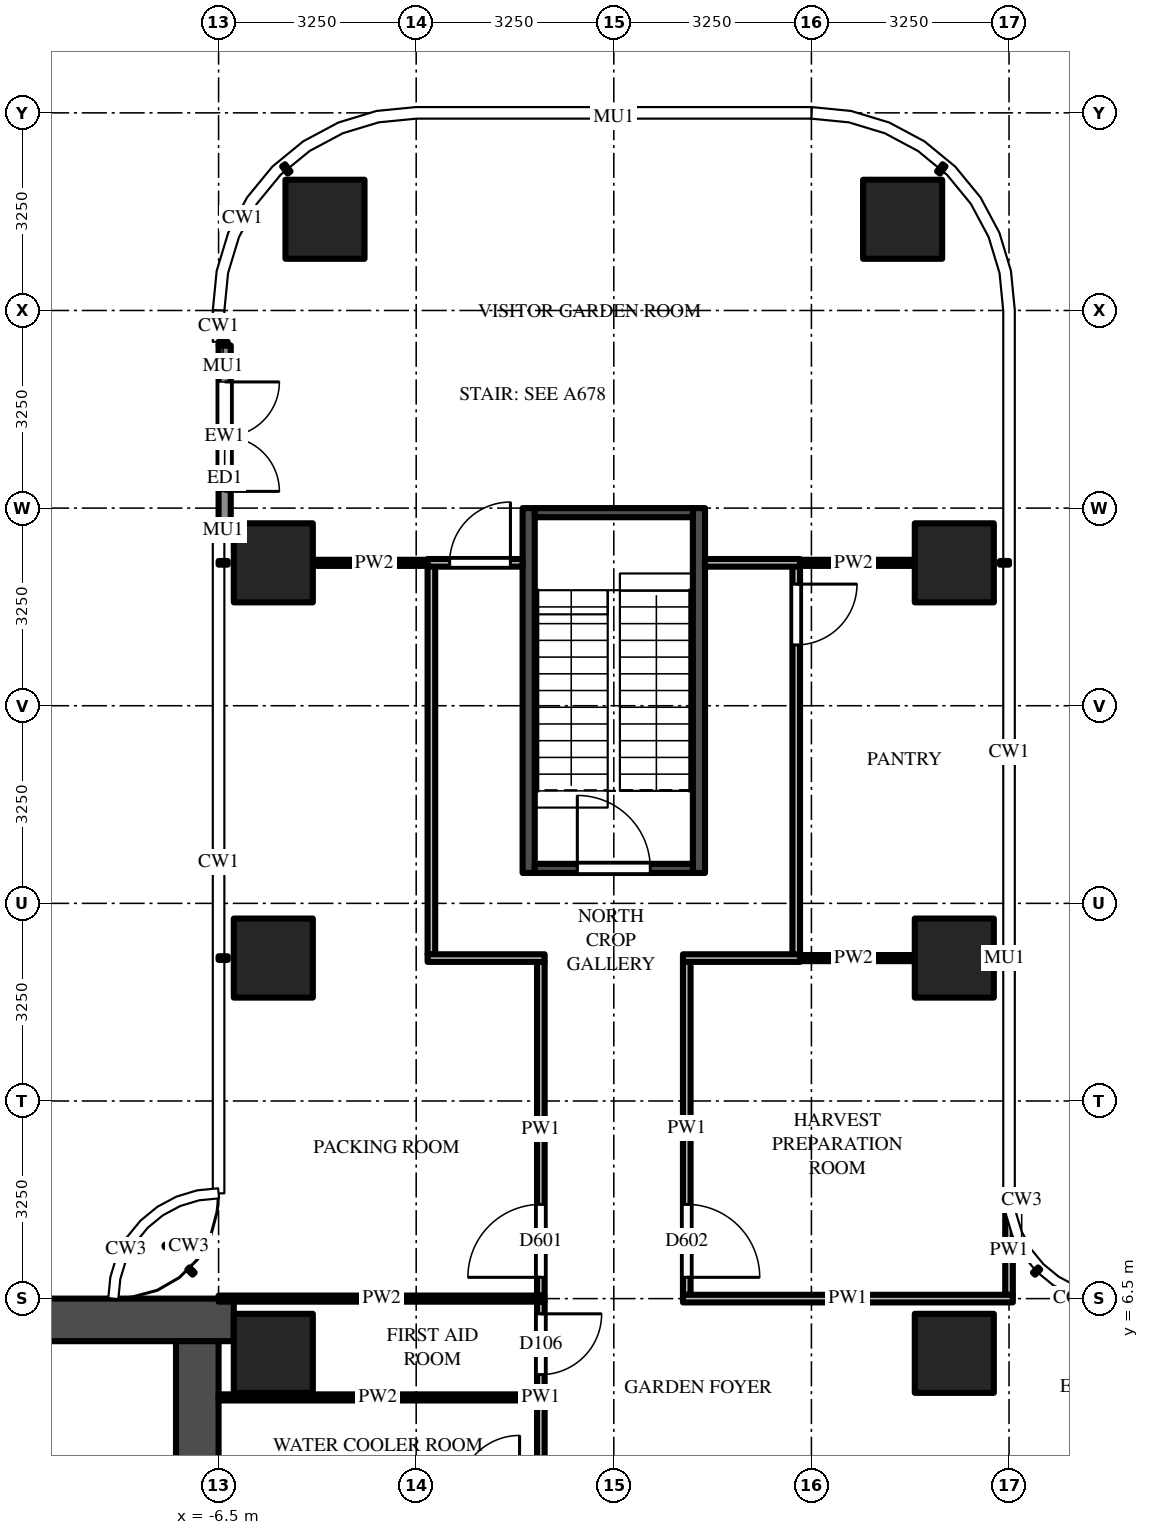
"""IFC4 building model, lengths in metres.
Left out: names, types, materials, properties, quantities, classifications, styles, units other than length and angle.
Written with IfcOpenShell. Run it as: python <this file> out.ifc"""

import sys

from ifc_helpers import new_model, si_unit, direction, frame, frame_2d, origin, origin_2d, place, context, subcontext, project, spatial, polyline, rectangle, outline, extrude, source, transform, mapped, element, fill, save


model = new_model("IFC4")
c1 = context("Model", 3, precision=1e-05, world=origin(), true_north=direction((0.0, 1.0)))
c2 = subcontext(c1, "Body", "Model", "MODEL_VIEW")
j1 = project(units=[si_unit("LENGTHUNIT", "METRE"), si_unit("PLANEANGLEUNIT", "RADIAN")], contexts=[c1])
p1 = place(None, origin())
s1 = spatial("IfcSite", under=j1, at=p1, CompositionType="ELEMENT")
p2 = place(p1, origin())
s2 = spatial("IfcBuilding", under=s1, at=p2, CompositionType="ELEMENT")
p3 = place(p2, frame((0.0, 0.0, 120.0)))
s3 = spatial("IfcBuildingStorey", under=s2, at=p3, CompositionType="ELEMENT", Elevation=120.0)
m1 = source(origin(), c2, "Body", "SweptSolid", [
    extrude(rectangle(XDim=1.3, YDim=1.3, at=origin_2d()), origin(), (0.0, 0.0, 1.0), 4.5),
])
for number, where, z_axis, x_axis in (
    (1, (-5.6, 12.1, 0.0), (0.0, 0.0, 1.0), (1.0, 0.0, 0.0)),
    (2, (-5.6, 18.6, 0.0), (0.0, 0.0, 1.0), (1.0, 0.0, 0.0)),
    (3, (-4.75, 24.25, 0.0), (0.0, 0.0, 1.0), (1.0, 0.0, 0.0)),
    (4, (5.6, 12.1, 0.0), (0.0, 0.0, 1.0), (1.0, 0.0, 0.0)),
    (5, (5.6, 18.6, 0.0), (0.0, 0.0, 1.0), (1.0, 0.0, 0.0)),
    (6, (4.75, 24.25, 0.0), (0.0, 0.0, 1.0), (1.0, 0.0, 0.0)),
    (7, (5.6, 5.6, 0.0), (0.0, 0.0, 1.0), (1.0, 0.0, 0.0)),
    (8, (-5.6, 5.6, 0.0), (0.0, 0.0, 1.0), (1.0, 0.0, 0.0)),
):
    element("IfcColumn", number, at=place(p3, frame(where, z_axis=z_axis, x_axis=x_axis)), inside=s3, PredefinedType="COLUMN", context=c2, shape_type="MappedRepresentation", body=[
        mapped(m1, transform((0.0, 0.0, 0.0))),
    ])
m2 = source(origin(), c2, "Body", "SweptSolid", [
    extrude(rectangle(XDim=16.5, YDim=0.7, at=frame_2d((8.25, 0.0))), origin(), (0.0, 0.0, 1.0), 4.25),
])
p4 = place(p3, frame((-6.25, 6.15, 0.0), z_axis=(0.0, 0.0, 1.0), x_axis=(-1.0, 0.0, 0.0)))
e9 = element("IfcWall", 9, at=p4, inside=s3, PredefinedType="SHEAR", context=c2, shape_type="MappedRepresentation", body=[
    mapped(m2, transform((0.0, 0.0, 0.0))),
])
m3 = source(origin(), c2, "Body", "SweptSolid", [
    extrude(rectangle(XDim=9.05, YDim=0.7, at=frame_2d((4.525, 0.0))), origin(), (0.0, 0.0, 1.0), 4.25),
])
p5 = place(p3, frame((-6.85, 5.8, 0.0), z_axis=(0.0, 0.0, 1.0), x_axis=(0.0, -1.0, 0.0)))
e10 = element("IfcWall", 10, at=p5, inside=s3, PredefinedType="SHEAR", context=c2, shape_type="MappedRepresentation", body=[
    mapped(m3, transform((0.0, 0.0, 0.0))),
])
m4 = source(origin(), c2, "Body", "SweptSolid", [
    extrude(rectangle(XDim=1.8, YDim=2.1, at=frame_2d((0.9, 1.05))), frame((0.0, 0.36, 0.0), z_axis=(0.0, -1.0, 0.0), x_axis=(1.0, 0.0, 0.0)), (0.0, 0.0, 1.0), 0.72),
])
p6 = place(p5, frame((3.15, 0.0, 0.0)))
e11 = element("IfcOpeningElement", 11, at=p6, cuts=e10, PredefinedType="OPENING", context=c2, shape_type="MappedRepresentation", body=[
    mapped(m4, transform((0.0, 0.0, 0.0))),
])
m5 = source(origin(), c2, "Body", "SweptSolid", [
    extrude(rectangle(XDim=6.0, YDim=0.2, at=frame_2d((3.0, 0.0))), origin(), (0.0, 0.0, 1.0), 4.25),
])
for number, where, z_axis, x_axis in (
    (12, (-1.4, 13.5, 0.0), (0.0, 0.0, 1.0), (0.0, 1.0, 0.0)),
    (13, (1.4, 13.5, 0.0), (0.0, 0.0, 1.0), (0.0, 1.0, 0.0)),
):
    element("IfcWall", number, at=place(p3, frame(where, z_axis=z_axis, x_axis=x_axis)), inside=s3, PredefinedType="SHEAR", context=c2, shape_type="MappedRepresentation", body=[
        mapped(m5, transform((0.0, 0.0, 0.0))),
    ])
m6 = source(origin(), c2, "Body", "SweptSolid", [
    extrude(rectangle(XDim=2.6, YDim=0.15, at=frame_2d((1.3, 0.0))), origin(), (0.0, 0.0, 1.0), 4.25),
])
p7 = place(p3, frame((-1.3, 13.575, 0.0), z_axis=(0.0, 0.0, 1.0), x_axis=(1.0, 0.0, 0.0)))
e14 = element("IfcWall", 14, at=p7, inside=s3, PredefinedType="SHEAR", context=c2, shape_type="MappedRepresentation", body=[
    mapped(m6, transform((0.0, 0.0, 0.0))),
])
m7 = source(origin(), c2, "Body", "SweptSolid", [
    extrude(rectangle(XDim=1.2, YDim=2.1, at=frame_2d((0.6, 1.05))), frame((0.0, 0.085, 0.0), z_axis=(0.0, -1.0, 0.0), x_axis=(1.0, 0.0, 0.0)), (0.0, 0.0, 1.0), 0.17),
])
p8 = place(p7, frame((0.7, 0.0, 0.0)))
e15 = element("IfcOpeningElement", 15, at=p8, cuts=e14, PredefinedType="OPENING", context=c2, shape_type="MappedRepresentation", body=[
    mapped(m7, transform((0.0, 0.0, 0.0))),
])
p9 = place(p3, frame((-1.3, 19.425, 0.0), z_axis=(0.0, 0.0, 1.0), x_axis=(1.0, 0.0, 0.0)))
e16 = element("IfcWall", 16, at=p9, inside=s3, PredefinedType="SHEAR", context=c2, shape_type="MappedRepresentation", body=[
    mapped(m6, transform((0.0, 0.0, 0.0))),
])
m8 = source(origin(), c2, "Body", "SweptSolid", [
    extrude(rectangle(XDim=3.0, YDim=0.2, at=frame_2d((1.5, 0.0))), origin(), (0.0, 0.0, 1.0), 4.25),
])
p10 = place(p3, frame((-6.4, 22.175, 0.0), z_axis=(0.0, 0.0, 1.0), x_axis=(0.0, -1.0, 0.0)))
e17 = element("IfcWall", 17, at=p10, inside=s3, PredefinedType="SOLIDWALL", context=c2, shape_type="MappedRepresentation", body=[
    mapped(m8, transform((0.0, 0.0, 0.0))),
])
m9 = source(origin(), c2, "Body", "SweptSolid", [
    extrude(rectangle(XDim=1.8, YDim=2.4, at=frame_2d((0.9, 1.2))), frame((0.0, 0.11, 0.0), z_axis=(0.0, -1.0, 0.0), x_axis=(1.0, 0.0, 0.0)), (0.0, 0.0, 1.0), 0.22),
])
p11 = place(p10, frame((0.6, 0.0, 0.0)))
e18 = element("IfcOpeningElement", 18, at=p11, cuts=e17, PredefinedType="OPENING", context=c2, shape_type="MappedRepresentation", body=[
    mapped(m9, transform((0.0, 0.0, 0.0))),
])
p12 = place(p3, origin())
e19 = element("IfcWall", 19, at=p12, inside=s3, PredefinedType="USERDEFINED", context=c2, shape_type="SweptSolid", body=[
    extrude(outline(polyline([(7.143, 26.729), (8.213, 25.394), (8.643, 23.74), (8.609, 23.503), (8.015, 23.588), (8.032, 23.706), (7.665, 25.118), (6.756, 26.252), (6.34, 26.464), (6.612, 26.999), (7.143, 26.729)])), origin(), (0.0, 0.0, 1.0), 0.5),
])
m10 = source(origin(), c2, "Body", "SweptSolid", [
    extrude(rectangle(XDim=6.387, YDim=0.125, at=frame_2d((3.194, 0.0))), origin(), (0.0, 0.0, 1.0), 3.468),
])
p13 = place(p3, frame((-3.0, 12.163, 0.0), z_axis=(0.0, 0.0, 1.0), x_axis=(0.0, 1.0, 0.0)))
e20 = element("IfcWall", 20, at=p13, inside=s3, PredefinedType="PARTITIONING", context=c2, shape_type="MappedRepresentation", body=[
    mapped(m10, transform((0.0, 0.0, 0.0))),
])
m11 = source(origin(), c2, "Body", "SweptSolid", [
    extrude(rectangle(XDim=3.137, YDim=0.125, at=frame_2d((1.569, 0.0))), origin(), (0.0, 0.0, 1.0), 3.468),
])
p14 = place(p3, frame((-1.2, 6.45, 0.0), z_axis=(0.0, 0.0, 1.0), x_axis=(0.0, -1.0, 0.0)))
e21 = element("IfcWall", 21, at=p14, inside=s3, PredefinedType="PARTITIONING", context=c2, shape_type="MappedRepresentation", body=[
    mapped(m11, transform((0.0, 0.0, 0.0))),
])
m12 = source(origin(), c2, "Body", "SweptSolid", [
    extrude(rectangle(XDim=1.0, YDim=2.1, at=frame_2d((0.5, 1.05))), frame((0.0, 0.073, 0.0), z_axis=(0.0, -1.0, 0.0), x_axis=(1.0, 0.0, 0.0)), (0.0, 0.0, 1.0), 0.145),
])
p15 = place(p14, frame((0.2, 0.0, 0.0)))
e22 = element("IfcOpeningElement", 22, at=p15, cuts=e21, PredefinedType="OPENING", context=c2, shape_type="MappedRepresentation", body=[
    mapped(m12, transform((0.0, 0.0, 0.0))),
])
m13 = source(origin(), c2, "Body", "SweptSolid", [
    extrude(rectangle(XDim=5.488, YDim=0.125, at=frame_2d((2.744, 0.0))), origin(), (0.0, 0.0, 1.0), 3.468),
])
p16 = place(p3, frame((-1.2, 6.55, 0.0), z_axis=(0.0, 0.0, 1.0), x_axis=(0.0, 1.0, 0.0)))
e23 = element("IfcWall", 23, at=p16, inside=s3, PredefinedType="PARTITIONING", context=c2, shape_type="MappedRepresentation", body=[
    mapped(m13, transform((0.0, 0.0, 0.0))),
])
m14 = source(origin(), c2, "Body", "SweptSolid", [
    extrude(rectangle(XDim=1.2, YDim=2.1, at=frame_2d((0.6, 1.05))), frame((0.0, 0.073, 0.0), z_axis=(0.0, -1.0, 0.0), x_axis=(1.0, 0.0, 0.0)), (0.0, 0.0, 1.0), 0.145),
])
p17 = place(p16, frame((0.3, 0.0, 0.0)))
e24 = element("IfcOpeningElement", 24, at=p17, cuts=e23, PredefinedType="OPENING", context=c2, shape_type="MappedRepresentation", body=[
    mapped(m14, transform((0.0, 0.0, 0.0))),
])
m15 = source(origin(), c2, "Body", "SweptSolid", [
    extrude(rectangle(XDim=5.475, YDim=0.125, at=frame_2d((2.738, 0.0))), origin(), (0.0, 0.0, 1.0), 3.468),
])
p18 = place(p3, frame((1.2, 12.038, 0.0), z_axis=(0.0, 0.0, 1.0), x_axis=(0.0, -1.0, 0.0)))
e25 = element("IfcWall", 25, at=p18, inside=s3, PredefinedType="PARTITIONING", context=c2, shape_type="MappedRepresentation", body=[
    mapped(m15, transform((0.0, 0.0, 0.0))),
])
p19 = place(p18, frame((3.988, 0.0, 0.0)))
e26 = element("IfcOpeningElement", 26, at=p19, cuts=e25, PredefinedType="OPENING", context=c2, shape_type="MappedRepresentation", body=[
    mapped(m14, transform((0.0, 0.0, 0.0))),
])
m16 = source(origin(), c2, "Body", "SweptSolid", [
    extrude(rectangle(XDim=6.4, YDim=0.125, at=frame_2d((3.2, 0.0))), origin(), (0.0, 0.0, 1.0), 3.468),
])
p20 = place(p3, frame((3.0, 18.55, 0.0), z_axis=(0.0, 0.0, 1.0), x_axis=(0.0, -1.0, 0.0)))
e27 = element("IfcWall", 27, at=p20, inside=s3, PredefinedType="PARTITIONING", context=c2, shape_type="MappedRepresentation", body=[
    mapped(m16, transform((0.0, 0.0, 0.0))),
])
p21 = place(p20, frame((0.3, 0.0, 0.0)))
e28 = element("IfcOpeningElement", 28, at=p21, cuts=e27, PredefinedType="OPENING", context=c2, shape_type="MappedRepresentation", body=[
    mapped(m12, transform((0.0, 0.0, 0.0))),
])
m17 = source(origin(), c2, "Body", "SweptSolid", [
    extrude(rectangle(XDim=1.469, YDim=0.125, at=frame_2d((0.734, 0.0))), origin(), (0.0, 0.0, 1.0), 4.25),
])
p22 = place(p3, frame((6.5, 6.562, 0.0), z_axis=(0.0, 0.0, 1.0), x_axis=(0.0, 1.0, 0.0)))
e29 = element("IfcWall", 29, at=p22, inside=s3, PredefinedType="PARTITIONING", context=c2, shape_type="MappedRepresentation", body=[
    mapped(m17, transform((0.0, 0.0, 0.0))),
])
m18 = source(origin(), c2, "Body", "SweptSolid", [
    extrude(rectangle(XDim=5.238, YDim=0.1, at=frame_2d((2.619, 0.0))), origin(), (0.0, 0.0, 1.0), 3.468),
])
p23 = place(p3, frame((-6.5, 4.875, 0.0), z_axis=(0.0, 0.0, 1.0), x_axis=(1.0, 0.0, 0.0)))
e30 = element("IfcWall", 30, at=p23, inside=s3, PredefinedType="PARTITIONING", context=c2, shape_type="MappedRepresentation", body=[
    mapped(m18, transform((0.0, 0.0, 0.0))),
])
m19 = source(origin(), c2, "Body", "SweptSolid", [
    extrude(rectangle(XDim=5.363, YDim=0.1, at=frame_2d((2.681, 0.0))), origin(), (0.0, 0.0, 1.0), 3.33),
])
p24 = place(p3, frame((-6.5, 6.5, 0.0), z_axis=(0.0, 0.0, 1.0), x_axis=(1.0, 0.0, 0.0)))
e31 = element("IfcWall", 31, at=p24, inside=s3, PredefinedType="PARTITIONING", context=c2, shape_type="MappedRepresentation", body=[
    mapped(m19, transform((0.0, 0.0, 0.0))),
])
m20 = source(origin(), c2, "Body", "SweptSolid", [
    extrude(rectangle(XDim=5.425, YDim=0.125, at=frame_2d((2.712, 0.0))), origin(), (0.0, 0.0, 1.0), 3.33),
])
p25 = place(p3, frame((1.137, 6.5, 0.0), z_axis=(0.0, 0.0, 1.0), x_axis=(1.0, 0.0, 0.0)))
e32 = element("IfcWall", 32, at=p25, inside=s3, PredefinedType="PARTITIONING", context=c2, shape_type="MappedRepresentation", body=[
    mapped(m20, transform((0.0, 0.0, 0.0))),
])
m21 = source(origin(), c2, "Body", "SweptSolid", [
    extrude(rectangle(XDim=2.012, YDim=0.1, at=frame_2d((1.006, 0.0))), origin(), (0.0, 0.0, 1.0), 3.468),
])
p26 = place(p3, frame((2.938, 12.1, 0.0), z_axis=(0.0, 0.0, 1.0), x_axis=(1.0, 0.0, 0.0)))
e33 = element("IfcWall", 33, at=p26, inside=s3, PredefinedType="PARTITIONING", context=c2, shape_type="MappedRepresentation", body=[
    mapped(m21, transform((0.0, 0.0, 0.0))),
])
m22 = source(origin(), c2, "Body", "SweptSolid", [
    extrude(rectangle(XDim=1.925, YDim=0.125, at=frame_2d((0.962, 0.0))), origin(), (0.0, 0.0, 1.0), 3.468),
])
for number, where, z_axis, x_axis in (
    (34, (-1.137, 12.1, 0.0), (0.0, 0.0, 1.0), (-1.0, 0.0, 0.0)),
    (35, (3.062, 12.1, 0.0), (0.0, 0.0, 1.0), (-1.0, 0.0, 0.0)),
):
    element("IfcWall", number, at=place(p3, frame(where, z_axis=z_axis, x_axis=x_axis)), inside=s3, PredefinedType="PARTITIONING", context=c2, shape_type="MappedRepresentation", body=[
        mapped(m22, transform((0.0, 0.0, 0.0))),
    ])
m23 = source(origin(), c2, "Body", "SweptSolid", [
    extrude(rectangle(XDim=2.012, YDim=0.1, at=frame_2d((1.006, 0.0))), origin(), (0.0, 0.0, 1.0), 3.697),
])
for number, where, z_axis, x_axis in (
    (36, (-4.95, 18.6, 0.0), (0.0, 0.0, 1.0), (1.0, 0.0, 0.0)),
    (37, (2.938, 18.6, 0.0), (0.0, 0.0, 1.0), (1.0, 0.0, 0.0)),
):
    element("IfcWall", number, at=place(p3, frame(where, z_axis=z_axis, x_axis=x_axis)), inside=s3, PredefinedType="PARTITIONING", context=c2, shape_type="MappedRepresentation", body=[
        mapped(m23, transform((0.0, 0.0, 0.0))),
    ])
m24 = source(origin(), c2, "Body", "SweptSolid", [
    extrude(rectangle(XDim=1.562, YDim=0.125, at=frame_2d((0.781, 0.0))), origin(), (0.0, 0.0, 1.0), 3.697),
])
p27 = place(p3, frame((-3.062, 18.6, 0.0), z_axis=(0.0, 0.0, 1.0), x_axis=(1.0, 0.0, 0.0)))
e38 = element("IfcWall", 38, at=p27, inside=s3, PredefinedType="PARTITIONING", context=c2, shape_type="MappedRepresentation", body=[
    mapped(m24, transform((0.0, 0.0, 0.0))),
])
p28 = place(p27, frame((0.363, 0.0, 0.0)))
e39 = element("IfcOpeningElement", 39, at=p28, cuts=e38, PredefinedType="OPENING", context=c2, shape_type="MappedRepresentation", body=[
    mapped(m12, transform((0.0, 0.0, 0.0))),
])
p29 = place(p3, frame((1.5, 18.6, 0.0), z_axis=(0.0, 0.0, 1.0), x_axis=(1.0, 0.0, 0.0)))
e40 = element("IfcWall", 40, at=p29, inside=s3, PredefinedType="PARTITIONING", context=c2, shape_type="MappedRepresentation", body=[
    mapped(m24, transform((0.0, 0.0, 0.0))),
])
m25 = source(origin(), c2, "Body", "SweptSolid", [
    extrude(rectangle(XDim=1.2, YDim=2.1, at=frame_2d((0.6, 1.05))), frame((0.0, 0.025, 0.0), z_axis=(0.0, -1.0, 0.0), x_axis=(1.0, 0.0, 0.0)), (0.0, 0.0, 1.0), 0.05),
])
p30 = place(p8, origin())
e41 = element("IfcDoor", 41, at=p30, inside=s3, OperationType="SINGLE_SWING_LEFT", PredefinedType="DOOR", context=c2, shape_type="MappedRepresentation", body=[
    mapped(m25, transform((0.0, 0.0, 0.0))),
])
fill(e15, e41)
m26 = source(origin(), c2, "Body", "SweptSolid", [
    extrude(rectangle(XDim=1.8, YDim=2.4, at=frame_2d((0.9, 1.2))), frame((0.0, 0.025, 0.0), z_axis=(0.0, -1.0, 0.0), x_axis=(1.0, 0.0, 0.0)), (0.0, 0.0, 1.0), 0.05),
])
p31 = place(p11, origin())
e42 = element("IfcDoor", 42, at=p31, inside=s3, OperationType="DOUBLE_DOOR_SINGLE_SWING", PredefinedType="DOOR", context=c2, shape_type="MappedRepresentation", body=[
    mapped(m26, transform((0.0, 0.0, 0.0))),
])
fill(e18, e42)
m27 = source(origin(), c2, "Body", "SweptSolid", [
    extrude(rectangle(XDim=1.0, YDim=2.1, at=frame_2d((0.5, 1.05))), frame((0.0, 0.025, 0.0), z_axis=(0.0, -1.0, 0.0), x_axis=(1.0, 0.0, 0.0)), (0.0, 0.0, 1.0), 0.05),
])
p32 = place(p15, origin())
e43 = element("IfcDoor", 43, at=p32, inside=s3, OperationType="SINGLE_SWING_LEFT", PredefinedType="DOOR", context=c2, shape_type="MappedRepresentation", body=[
    mapped(m27, transform((0.0, 0.0, 0.0))),
])
fill(e22, e43)
p33 = place(p17, origin())
e44 = element("IfcDoor", 44, at=p33, inside=s3, OperationType="SINGLE_SWING_LEFT", PredefinedType="DOOR", context=c2, shape_type="MappedRepresentation", body=[
    mapped(m25, transform((0.0, 0.0, 0.0))),
])
fill(e24, e44)
p34 = place(p19, origin())
e45 = element("IfcDoor", 45, at=p34, inside=s3, OperationType="SINGLE_SWING_RIGHT", PredefinedType="DOOR", context=c2, shape_type="MappedRepresentation", body=[
    mapped(m25, transform((0.0, 0.0, 0.0))),
])
fill(e26, e45)
p35 = place(p21, origin())
e46 = element("IfcDoor", 46, at=p35, inside=s3, OperationType="SINGLE_SWING_LEFT", PredefinedType="DOOR", context=c2, shape_type="MappedRepresentation", body=[
    mapped(m27, transform((0.0, 0.0, 0.0))),
])
fill(e28, e46)
p36 = place(p28, origin())
e47 = element("IfcDoor", 47, at=p36, inside=s3, OperationType="SINGLE_SWING_RIGHT", PredefinedType="DOOR", context=c2, shape_type="MappedRepresentation", body=[
    mapped(m27, transform((0.0, 0.0, 0.0))),
])
fill(e39, e47)
save(model, sys.argv[1])
